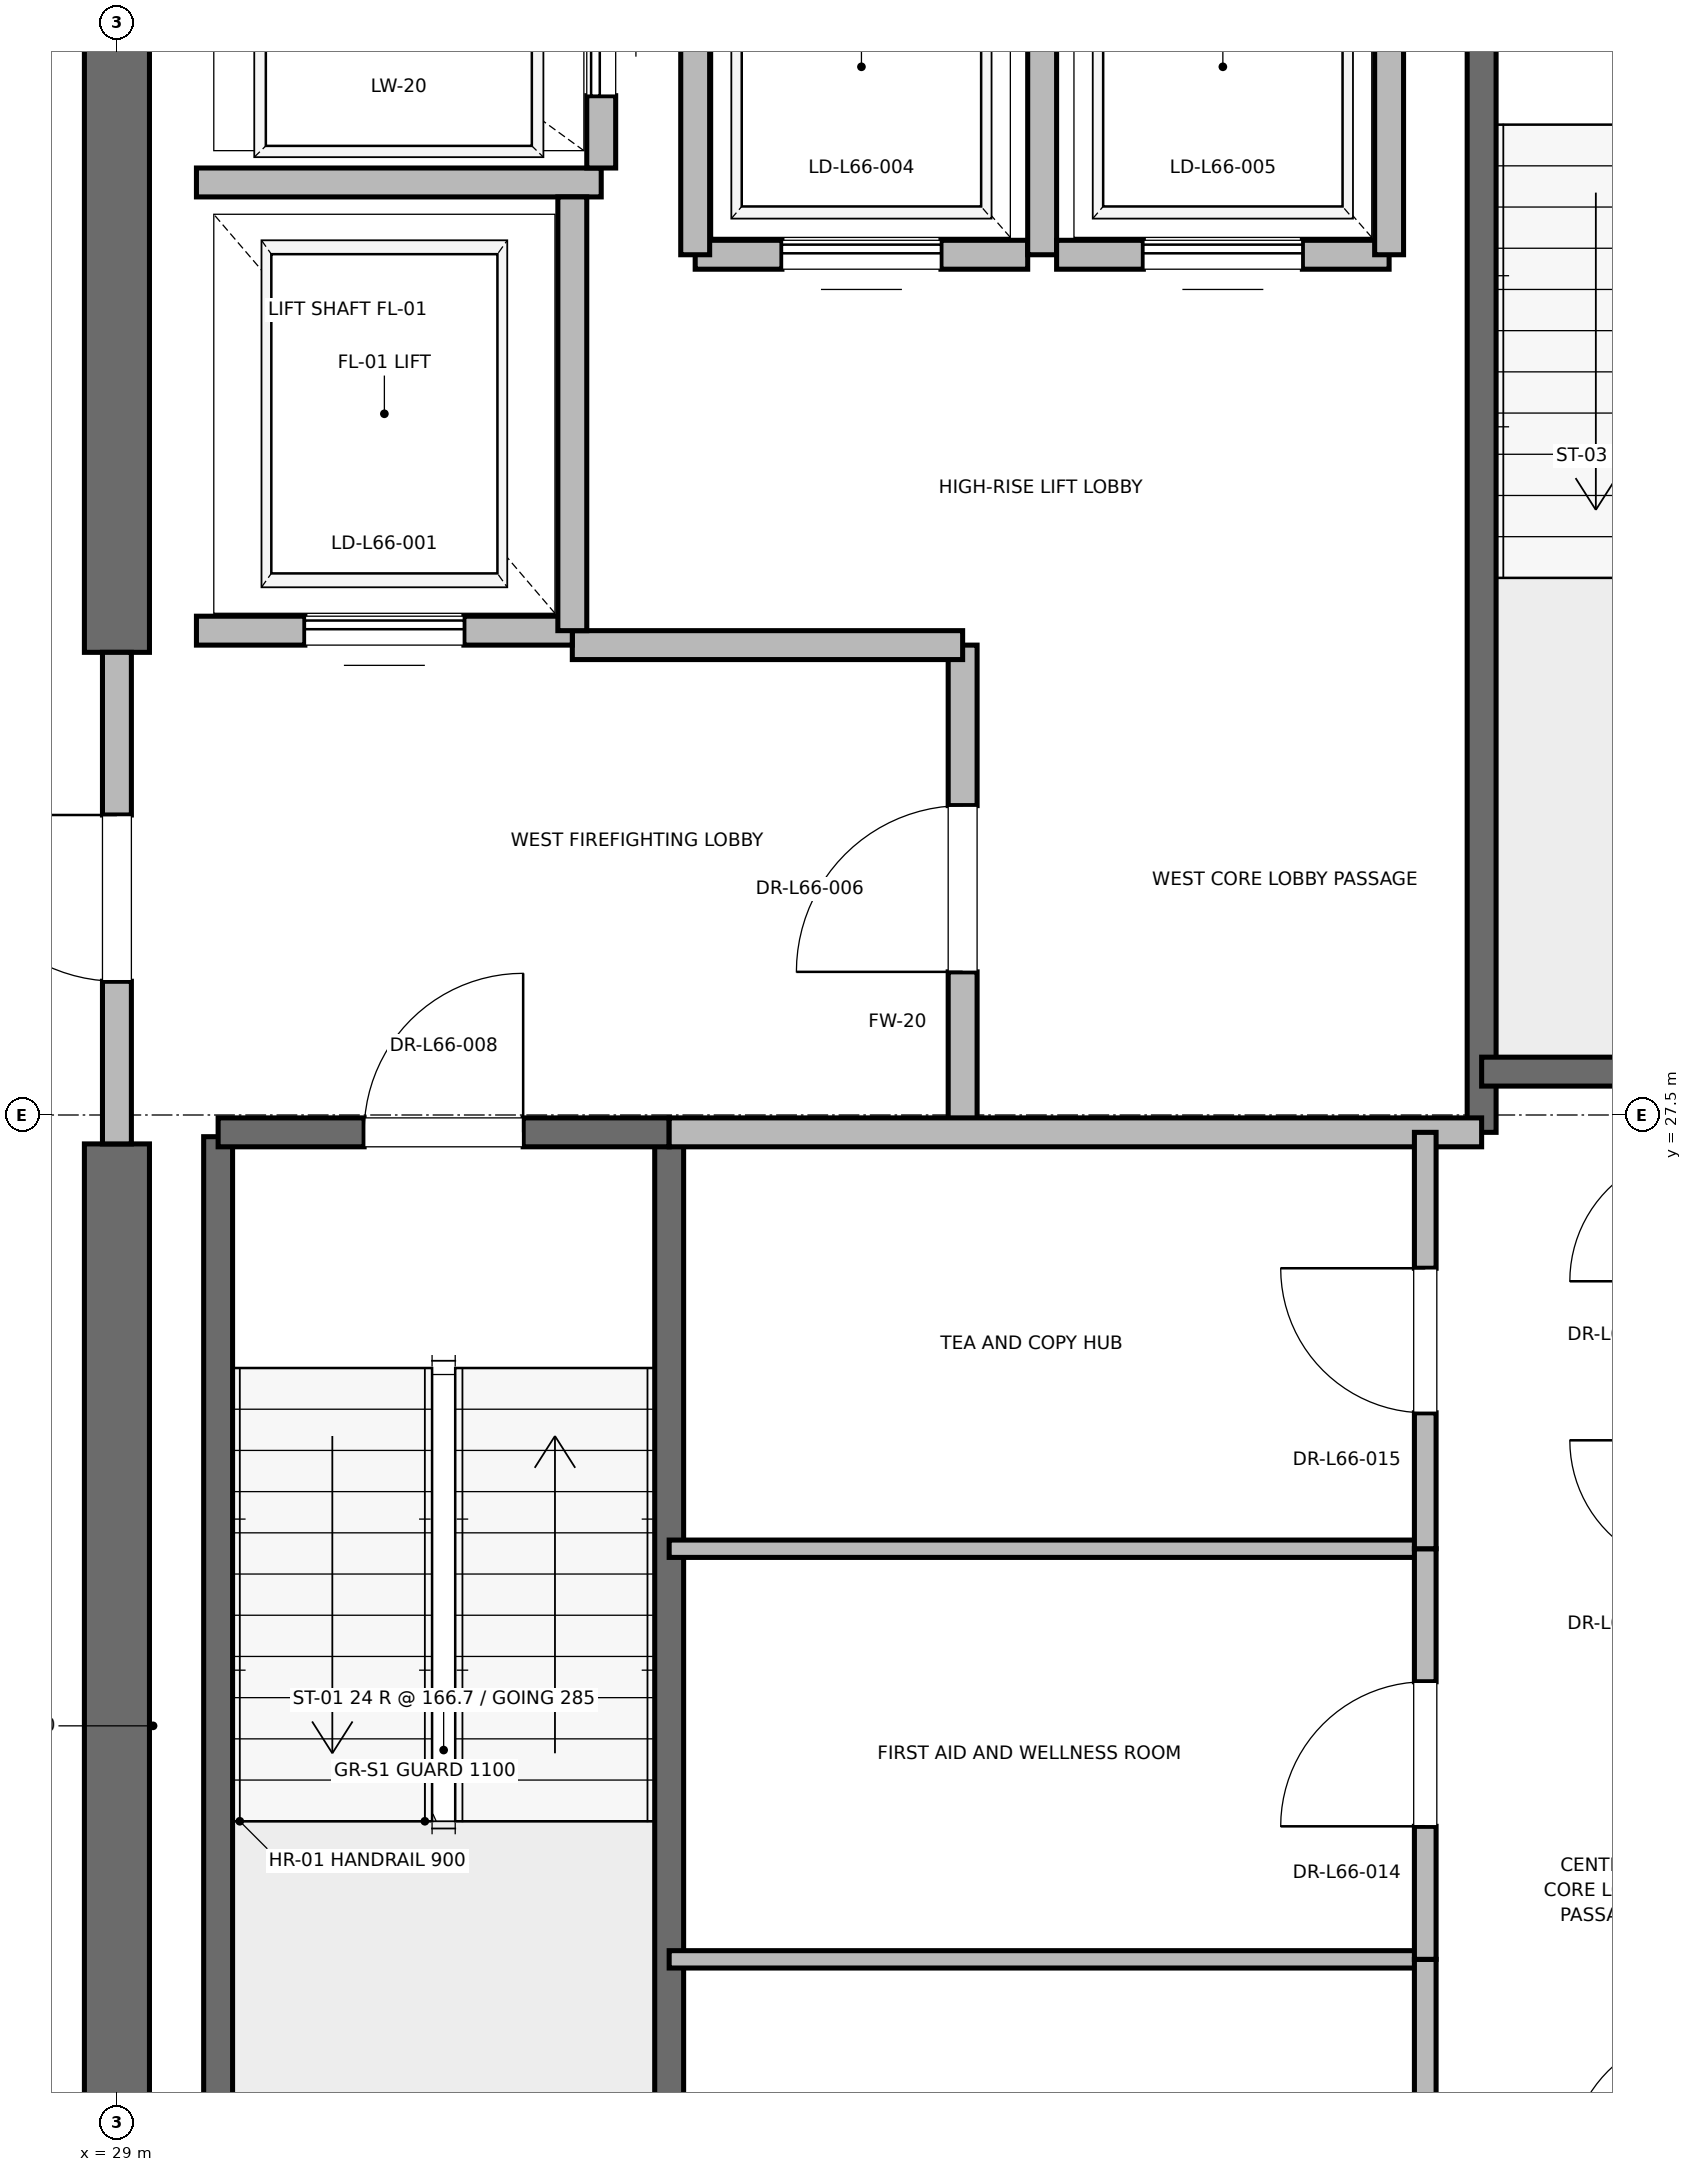
"""IFC4 building model, lengths in metres.
Left out: names, types, materials, properties, quantities, classifications, styles, units other than length and angle.
Written with IfcOpenShell. Run it as: python <this file> out.ifc"""

import sys

from ifc_helpers import new_model, si_unit, direction, frame, frame_2d, origin, place, context, subcontext, project, spatial, rectangle, extrude, element, fill, save


model = new_model("IFC4")
c1 = context("Model", 3, precision=1e-05, world=origin(), true_north=direction((0.0, 1.0)))
c2 = subcontext(c1, "Body", "Model", "MODEL_VIEW")
j1 = project(units=[si_unit("LENGTHUNIT", "METRE"), si_unit("PLANEANGLEUNIT", "RADIAN")], contexts=[c1])
p1 = place(None, origin())
s1 = spatial("IfcSite", under=j1, at=p1, CompositionType="ELEMENT")
p2 = place(p1, origin())
s2 = spatial("IfcBuilding", under=s1, at=p2, CompositionType="ELEMENT")
p3 = place(p2, frame((0.0, 0.0, 283.2)))
s3 = spatial("IfcBuildingStorey", under=s2, at=p3, CompositionType="ELEMENT", Elevation=283.2)
p4 = place(p3, frame((29.0, 18.5, 0.0), z_axis=(0.0, 0.0, 1.0), x_axis=(0.0, 1.0, 0.0)))
e1 = element("IfcWall", 1, at=p4, inside=s3, PredefinedType="SHEAR", context=c2, shape_type="SweptSolid", body=[
    extrude(rectangle(XDim=8.8, YDim=0.45, at=frame_2d((4.4, 0.0))), origin(), (0.0, 0.0, 1.0), 3.785),
])
p5 = place(p3, frame((29.0, 30.7, 0.0), z_axis=(0.0, 0.0, 1.0), x_axis=(0.0, 1.0, 0.0)))
e2 = element("IfcWall", 2, at=p5, inside=s3, PredefinedType="SHEAR", context=c2, shape_type="SweptSolid", body=[
    extrude(rectangle(XDim=5.8, YDim=0.45, at=frame_2d((2.9, 0.0))), origin(), (0.0, 0.0, 1.0), 3.785),
])
p6 = place(p3, frame((29.7, 19.2, 0.0), z_axis=(0.0, 0.0, 1.0), x_axis=(0.0, 1.0, 0.0)))
e3 = element("IfcWall", 3, at=p6, inside=s3, PredefinedType="SOLIDWALL", context=c2, shape_type="SweptSolid", body=[
    extrude(rectangle(XDim=8.15, YDim=0.2, at=frame_2d((4.075, 0.0))), origin(), (0.0, 0.0, 1.0), 3.785),
])
p7 = place(p3, frame((32.82, 18.6, 0.0), z_axis=(0.0, 0.0, 1.0), x_axis=(0.0, 1.0, 0.0)))
e4 = element("IfcWall", 4, at=p7, inside=s3, PredefinedType="SOLIDWALL", context=c2, shape_type="SweptSolid", body=[
    extrude(rectangle(XDim=8.78, YDim=0.2, at=frame_2d((4.39, 0.0))), origin(), (0.0, 0.0, 1.0), 3.785),
])
p8 = place(p3, frame((29.7, 27.38, 0.0), z_axis=(0.0, 0.0, 1.0), x_axis=(1.0, 0.0, 0.0)))
e5 = element("IfcWall", 5, at=p8, inside=s3, PredefinedType="SOLIDWALL", context=c2, shape_type="SweptSolid", body=[
    extrude(rectangle(XDim=3.12, YDim=0.2, at=frame_2d((1.56, 0.0))), origin(), (0.0, 0.0, 1.0), 3.785),
])
p9 = place(p8, frame((1.01, 0.0, 0.0)))
e6 = element("IfcOpeningElement", 6, at=p9, cuts=e5, PredefinedType="OPENING", context=c2, shape_type="SweptSolid", body=[
    extrude(rectangle(XDim=1.1, YDim=2.15, at=frame_2d((0.55, 1.075))), frame((0.0, 0.1, 0.0), z_axis=(0.0, -1.0, 0.0), x_axis=(1.0, 0.0, 0.0)), (0.0, 0.0, 1.0), 0.2),
])
p10 = place(p3, frame((38.44, 27.38, 0.0), z_axis=(0.0, 0.0, 1.0), x_axis=(0.0, 1.0, 0.0)))
e7 = element("IfcWall", 7, at=p10, inside=s3, PredefinedType="SOLIDWALL", context=c2, shape_type="SweptSolid", body=[
    extrude(rectangle(XDim=8.87, YDim=0.2, at=frame_2d((4.435, 0.0))), origin(), (0.0, 0.0, 1.0), 3.785),
])
p11 = place(p3, frame((38.44, 27.8, 0.0), z_axis=(0.0, 0.0, 1.0), x_axis=(1.0, 0.0, 0.0)))
e8 = element("IfcWall", 8, at=p11, inside=s3, PredefinedType="SOLIDWALL", context=c2, shape_type="SweptSolid", body=[
    extrude(rectangle(XDim=3.32, YDim=0.2, at=frame_2d((1.66, 0.0))), origin(), (0.0, 0.0, 1.0), 3.785),
])
p12 = place(p3, frame((34.85, 27.38, 0.0), z_axis=(0.0, 0.0, 1.0), x_axis=(0.0, 1.0, 0.0)))
e9 = element("IfcWall", 9, at=p12, inside=s3, PredefinedType="PARTITIONING", context=c2, shape_type="SweptSolid", body=[
    extrude(rectangle(XDim=3.37, YDim=0.2, at=frame_2d((1.685, 0.0))), origin(), (0.0, 0.0, 1.0), 3.785),
])
p13 = place(p12, frame((1.11, 0.0, 0.0)))
e10 = element("IfcOpeningElement", 10, at=p13, cuts=e9, PredefinedType="OPENING", context=c2, shape_type="SweptSolid", body=[
    extrude(rectangle(XDim=1.15, YDim=2.2, at=frame_2d((0.575, 1.1))), frame((0.0, 0.1, 0.0), z_axis=(0.0, -1.0, 0.0), x_axis=(1.0, 0.0, 0.0)), (0.0, 0.0, 1.0), 0.2),
])
p14 = place(p3, frame((29.0, 27.3, 0.0), z_axis=(0.0, 0.0, 1.0), x_axis=(0.0, 1.0, 0.0)))
e11 = element("IfcWall", 11, at=p14, inside=s3, PredefinedType="PARTITIONING", context=c2, shape_type="SweptSolid", body=[
    extrude(rectangle(XDim=3.4, YDim=0.2, at=frame_2d((1.7, 0.0))), origin(), (0.0, 0.0, 1.0), 2.865),
])
p15 = place(p14, frame((1.125, 0.0, 0.0)))
e12 = element("IfcOpeningElement", 12, at=p15, cuts=e11, PredefinedType="OPENING", context=c2, shape_type="SweptSolid", body=[
    extrude(rectangle(XDim=1.15, YDim=2.2, at=frame_2d((0.575, 1.1))), frame((0.0, 0.1, 0.0), z_axis=(0.0, -1.0, 0.0), x_axis=(1.0, 0.0, 0.0)), (0.0, 0.0, 1.0), 0.2),
])
p16 = place(p3, frame((32.82, 27.38, 0.0), z_axis=(0.0, 0.0, 1.0), x_axis=(1.0, 0.0, 0.0)))
e13 = element("IfcWall", 13, at=p16, inside=s3, PredefinedType="PARTITIONING", context=c2, shape_type="SweptSolid", body=[
    extrude(rectangle(XDim=5.62, YDim=0.2, at=frame_2d((2.81, 0.0))), origin(), (0.0, 0.0, 1.0), 3.785),
])
p17 = place(p3, frame((32.15, 30.75, 0.0), z_axis=(0.0, 0.0, 1.0), x_axis=(1.0, 0.0, 0.0)))
e14 = element("IfcWall", 14, at=p17, inside=s3, PredefinedType="PARTITIONING", context=c2, shape_type="SweptSolid", body=[
    extrude(rectangle(XDim=2.7, YDim=0.2, at=frame_2d((1.35, 0.0))), origin(), (0.0, 0.0, 1.0), 3.785),
])
p18 = place(p3, frame((29.55, 30.85, 0.0), z_axis=(0.0, 0.0, 1.0), x_axis=(1.0, 0.0, 0.0)))
e15 = element("IfcWall", 15, at=p18, inside=s3, PredefinedType="SOLIDWALL", context=c2, shape_type="SweptSolid", body=[
    extrude(rectangle(XDim=2.6, YDim=0.2, at=frame_2d((1.3, 0.0))), origin(), (0.0, 0.0, 1.0), 2.865),
])
p19 = place(p18, frame((0.75, 0.0, 0.0)))
e16 = element("IfcOpeningElement", 16, at=p19, cuts=e15, PredefinedType="OPENING", context=c2, shape_type="SweptSolid", body=[
    extrude(rectangle(XDim=1.1, YDim=2.2, at=frame_2d((0.55, 1.1))), frame((0.0, 0.1, 0.0), z_axis=(0.0, -1.0, 0.0), x_axis=(1.0, 0.0, 0.0)), (0.0, 0.0, 1.0), 0.2),
])
p20 = place(p3, frame((29.55, 33.95, 0.0), z_axis=(0.0, 0.0, 1.0), x_axis=(1.0, 0.0, 0.0)))
e17 = element("IfcWall", 17, at=p20, inside=s3, PredefinedType="SOLIDWALL", context=c2, shape_type="SweptSolid", body=[
    extrude(rectangle(XDim=2.8, YDim=0.2, at=frame_2d((1.4, 0.0))), origin(), (0.0, 0.0, 1.0), 3.785),
])
p21 = place(p3, frame((32.15, 30.85, 0.0), z_axis=(0.0, 0.0, 1.0), x_axis=(0.0, 1.0, 0.0)))
e18 = element("IfcWall", 18, at=p21, inside=s3, PredefinedType="SOLIDWALL", context=c2, shape_type="SweptSolid", body=[
    extrude(rectangle(XDim=3.0, YDim=0.2, at=frame_2d((1.5, 0.0))), origin(), (0.0, 0.0, 1.0), 3.785),
])
p22 = place(p3, frame((32.35, 34.05, 0.0), z_axis=(0.0, 0.0, 1.0), x_axis=(0.0, 1.0, 0.0)))
e19 = element("IfcWall", 19, at=p22, inside=s3, PredefinedType="SOLIDWALL", context=c2, shape_type="SweptSolid", body=[
    extrude(rectangle(XDim=2.1, YDim=0.2, at=frame_2d((1.05, 0.0))), origin(), (0.0, 0.0, 1.0), 3.785),
])
p23 = place(p22, frame((0.5, 0.0, 0.0)))
e20 = element("IfcOpeningElement", 20, at=p23, cuts=e19, PredefinedType="OPENING", context=c2, shape_type="SweptSolid", body=[
    extrude(rectangle(XDim=1.1, YDim=2.2, at=frame_2d((0.55, 1.1))), frame((0.0, 0.1, 0.0), z_axis=(0.0, -1.0, 0.0), x_axis=(1.0, 0.0, 0.0)), (0.0, 0.0, 1.0), 0.2),
])
p24 = place(p3, frame((33.0, 33.45, 0.0), z_axis=(0.0, 0.0, 1.0), x_axis=(1.0, 0.0, 0.0)))
e21 = element("IfcWall", 21, at=p24, inside=s3, PredefinedType="SOLIDWALL", context=c2, shape_type="SweptSolid", body=[
    extrude(rectangle(XDim=2.3, YDim=0.2, at=frame_2d((1.15, 0.0))), origin(), (0.0, 0.0, 1.0), 3.785),
])
p25 = place(p24, frame((0.6, 0.0, 0.0)))
e22 = element("IfcOpeningElement", 22, at=p25, cuts=e21, PredefinedType="OPENING", context=c2, shape_type="SweptSolid", body=[
    extrude(rectangle(XDim=1.1, YDim=2.2, at=frame_2d((0.55, 1.1))), frame((0.0, 0.1, 0.0), z_axis=(0.0, -1.0, 0.0), x_axis=(1.0, 0.0, 0.0)), (0.0, 0.0, 1.0), 0.2),
])
p26 = place(p3, frame((33.0, 36.05, 0.0), z_axis=(0.0, 0.0, 1.0), x_axis=(0.0, -1.0, 0.0)))
e23 = element("IfcWall", 23, at=p26, inside=s3, PredefinedType="SOLIDWALL", context=c2, shape_type="SweptSolid", body=[
    extrude(rectangle(XDim=2.6, YDim=0.2, at=frame_2d((1.3, 0.0))), origin(), (0.0, 0.0, 1.0), 3.785),
])
p27 = place(p3, frame((35.4, 33.45, 0.0), z_axis=(0.0, 0.0, 1.0), x_axis=(0.0, 1.0, 0.0)))
e24 = element("IfcWall", 24, at=p27, inside=s3, PredefinedType="SOLIDWALL", context=c2, shape_type="SweptSolid", body=[
    extrude(rectangle(XDim=2.6, YDim=0.2, at=frame_2d((1.3, 0.0))), origin(), (0.0, 0.0, 1.0), 2.865),
])
p28 = place(p3, frame((35.5, 33.45, 0.0), z_axis=(0.0, 0.0, 1.0), x_axis=(1.0, 0.0, 0.0)))
e25 = element("IfcWall", 25, at=p28, inside=s3, PredefinedType="SOLIDWALL", context=c2, shape_type="SweptSolid", body=[
    extrude(rectangle(XDim=2.3, YDim=0.2, at=frame_2d((1.15, 0.0))), origin(), (0.0, 0.0, 1.0), 3.785),
])
p29 = place(p28, frame((0.6, 0.0, 0.0)))
e26 = element("IfcOpeningElement", 26, at=p29, cuts=e25, PredefinedType="OPENING", context=c2, shape_type="SweptSolid", body=[
    extrude(rectangle(XDim=1.1, YDim=2.2, at=frame_2d((0.55, 1.1))), frame((0.0, 0.1, 0.0), z_axis=(0.0, -1.0, 0.0), x_axis=(1.0, 0.0, 0.0)), (0.0, 0.0, 1.0), 0.2),
])
p30 = place(p3, frame((37.8, 33.45, 0.0), z_axis=(0.0, 0.0, 1.0), x_axis=(0.0, 1.0, 0.0)))
e27 = element("IfcWall", 27, at=p30, inside=s3, PredefinedType="SOLIDWALL", context=c2, shape_type="SweptSolid", body=[
    extrude(rectangle(XDim=2.6, YDim=0.2, at=frame_2d((1.3, 0.0))), origin(), (0.0, 0.0, 1.0), 2.865),
])
for number, where, z_axis, x_axis in (
    (28, (32.82, 21.66, 0.0), (0.0, 0.0, 1.0), (1.0, 0.0, 0.0)),
    (29, (32.82, 24.5, 0.0), (0.0, 0.0, 1.0), (1.0, 0.0, 0.0)),
):
    element("IfcWall", number, at=place(p3, frame(where, z_axis=z_axis, x_axis=x_axis)), inside=s3, PredefinedType="PARTITIONING", context=c2, shape_type="SweptSolid", body=[
        extrude(rectangle(XDim=5.23, YDim=0.12, at=frame_2d((2.615, 0.0))), origin(), (0.0, 0.0, 1.0), 2.85),
    ])
p31 = place(p3, frame((38.05, 18.6, 0.0), z_axis=(0.0, 0.0, 1.0), x_axis=(0.0, 1.0, 0.0)))
e30 = element("IfcWall", 30, at=p31, inside=s3, PredefinedType="PARTITIONING", context=c2, shape_type="SweptSolid", body=[
    extrude(rectangle(XDim=3.06, YDim=0.15, at=frame_2d((1.53, 0.0))), origin(), (0.0, 0.0, 1.0), 2.85),
])
p32 = place(p31, frame((1.03, 0.0, 0.0)))
e31 = element("IfcOpeningElement", 31, at=p32, cuts=e30, PredefinedType="OPENING", context=c2, shape_type="SweptSolid", body=[
    extrude(rectangle(XDim=1.0, YDim=2.15, at=frame_2d((0.5, 1.075))), frame((0.0, 0.075, 0.0), z_axis=(0.0, -1.0, 0.0), x_axis=(1.0, 0.0, 0.0)), (0.0, 0.0, 1.0), 0.15),
])
p33 = place(p3, frame((38.05, 21.66, 0.0), z_axis=(0.0, 0.0, 1.0), x_axis=(0.0, 1.0, 0.0)))
e32 = element("IfcWall", 32, at=p33, inside=s3, PredefinedType="PARTITIONING", context=c2, shape_type="SweptSolid", body=[
    extrude(rectangle(XDim=2.84, YDim=0.15, at=frame_2d((1.42, 0.0))), origin(), (0.0, 0.0, 1.0), 2.85),
])
p34 = place(p33, frame((0.92, 0.0, 0.0)))
e33 = element("IfcOpeningElement", 33, at=p34, cuts=e32, PredefinedType="OPENING", context=c2, shape_type="SweptSolid", body=[
    extrude(rectangle(XDim=1.0, YDim=2.15, at=frame_2d((0.5, 1.075))), frame((0.0, 0.075, 0.0), z_axis=(0.0, -1.0, 0.0), x_axis=(1.0, 0.0, 0.0)), (0.0, 0.0, 1.0), 0.15),
])
p35 = place(p3, frame((38.05, 24.5, 0.0), z_axis=(0.0, 0.0, 1.0), x_axis=(0.0, 1.0, 0.0)))
e34 = element("IfcWall", 34, at=p35, inside=s3, PredefinedType="PARTITIONING", context=c2, shape_type="SweptSolid", body=[
    extrude(rectangle(XDim=2.88, YDim=0.15, at=frame_2d((1.44, 0.0))), origin(), (0.0, 0.0, 1.0), 2.85),
])
p36 = place(p35, frame((0.94, 0.0, 0.0)))
e35 = element("IfcOpeningElement", 35, at=p36, cuts=e34, PredefinedType="OPENING", context=c2, shape_type="SweptSolid", body=[
    extrude(rectangle(XDim=1.0, YDim=2.15, at=frame_2d((0.5, 1.075))), frame((0.0, 0.075, 0.0), z_axis=(0.0, -1.0, 0.0), x_axis=(1.0, 0.0, 0.0)), (0.0, 0.0, 1.0), 0.15),
])
p37 = place(p9, origin())
e36 = element("IfcDoor", 36, at=p37, inside=s3, OperationType="SINGLE_SWING_RIGHT", PredefinedType="DOOR", context=c2, shape_type="SweptSolid", body=[
    extrude(rectangle(XDim=1.1, YDim=2.15, at=frame_2d((0.55, 1.075))), frame((0.0, 0.025, 0.0), z_axis=(0.0, -1.0, 0.0), x_axis=(1.0, 0.0, 0.0)), (0.0, 0.0, 1.0), 0.05),
])
fill(e6, e36)
p38 = place(p13, origin())
e37 = element("IfcDoor", 37, at=p38, inside=s3, OperationType="SINGLE_SWING_LEFT", PredefinedType="DOOR", context=c2, shape_type="SweptSolid", body=[
    extrude(rectangle(XDim=1.15, YDim=2.2, at=frame_2d((0.575, 1.1))), frame((0.0, 0.025, 0.0), z_axis=(0.0, -1.0, 0.0), x_axis=(1.0, 0.0, 0.0)), (0.0, 0.0, 1.0), 0.05),
])
fill(e10, e37)
p39 = place(p15, origin())
e38 = element("IfcDoor", 38, at=p39, inside=s3, OperationType="SINGLE_SWING_RIGHT", PredefinedType="DOOR", context=c2, shape_type="SweptSolid", body=[
    extrude(rectangle(XDim=1.15, YDim=2.2, at=frame_2d((0.575, 1.1))), frame((0.0, 0.025, 0.0), z_axis=(0.0, -1.0, 0.0), x_axis=(1.0, 0.0, 0.0)), (0.0, 0.0, 1.0), 0.05),
])
fill(e12, e38)
p40 = place(p19, origin())
e39 = element("IfcDoor", 39, at=p40, inside=s3, OperationType="SLIDING_TO_RIGHT", PredefinedType="DOOR", context=c2, shape_type="SweptSolid", body=[
    extrude(rectangle(XDim=1.1, YDim=2.2, at=frame_2d((0.55, 1.1))), frame((0.0, 0.025, 0.0), z_axis=(0.0, -1.0, 0.0), x_axis=(1.0, 0.0, 0.0)), (0.0, 0.0, 1.0), 0.05),
])
fill(e16, e39)
p41 = place(p23, origin())
e40 = element("IfcDoor", 40, at=p41, inside=s3, OperationType="SLIDING_TO_RIGHT", PredefinedType="DOOR", context=c2, shape_type="SweptSolid", body=[
    extrude(rectangle(XDim=1.1, YDim=2.2, at=frame_2d((0.55, 1.1))), frame((0.0, 0.025, 0.0), z_axis=(0.0, -1.0, 0.0), x_axis=(1.0, 0.0, 0.0)), (0.0, 0.0, 1.0), 0.05),
])
fill(e20, e40)
p42 = place(p25, origin())
e41 = element("IfcDoor", 41, at=p42, inside=s3, OperationType="SLIDING_TO_RIGHT", PredefinedType="DOOR", context=c2, shape_type="SweptSolid", body=[
    extrude(rectangle(XDim=1.1, YDim=2.2, at=frame_2d((0.55, 1.1))), frame((0.0, 0.025, 0.0), z_axis=(0.0, -1.0, 0.0), x_axis=(1.0, 0.0, 0.0)), (0.0, 0.0, 1.0), 0.05),
])
fill(e22, e41)
p43 = place(p29, origin())
e42 = element("IfcDoor", 42, at=p43, inside=s3, OperationType="SLIDING_TO_RIGHT", PredefinedType="DOOR", context=c2, shape_type="SweptSolid", body=[
    extrude(rectangle(XDim=1.1, YDim=2.2, at=frame_2d((0.55, 1.1))), frame((0.0, 0.025, 0.0), z_axis=(0.0, -1.0, 0.0), x_axis=(1.0, 0.0, 0.0)), (0.0, 0.0, 1.0), 0.05),
])
fill(e26, e42)
p44 = place(p34, origin())
e43 = element("IfcDoor", 43, at=p44, inside=s3, OperationType="SINGLE_SWING_LEFT", PredefinedType="DOOR", context=c2, shape_type="SweptSolid", body=[
    extrude(rectangle(XDim=1.0, YDim=2.15, at=frame_2d((0.5, 1.075))), frame((0.0, 0.025, 0.0), z_axis=(0.0, -1.0, 0.0), x_axis=(1.0, 0.0, 0.0)), (0.0, 0.0, 1.0), 0.05),
])
fill(e33, e43)
p45 = place(p36, origin())
e44 = element("IfcDoor", 44, at=p45, inside=s3, OperationType="SINGLE_SWING_RIGHT", PredefinedType="DOOR", context=c2, shape_type="SweptSolid", body=[
    extrude(rectangle(XDim=1.0, YDim=2.15, at=frame_2d((0.5, 1.075))), frame((0.0, 0.025, 0.0), z_axis=(0.0, -1.0, 0.0), x_axis=(1.0, 0.0, 0.0)), (0.0, 0.0, 1.0), 0.05),
])
fill(e35, e44)
save(model, sys.argv[1])
